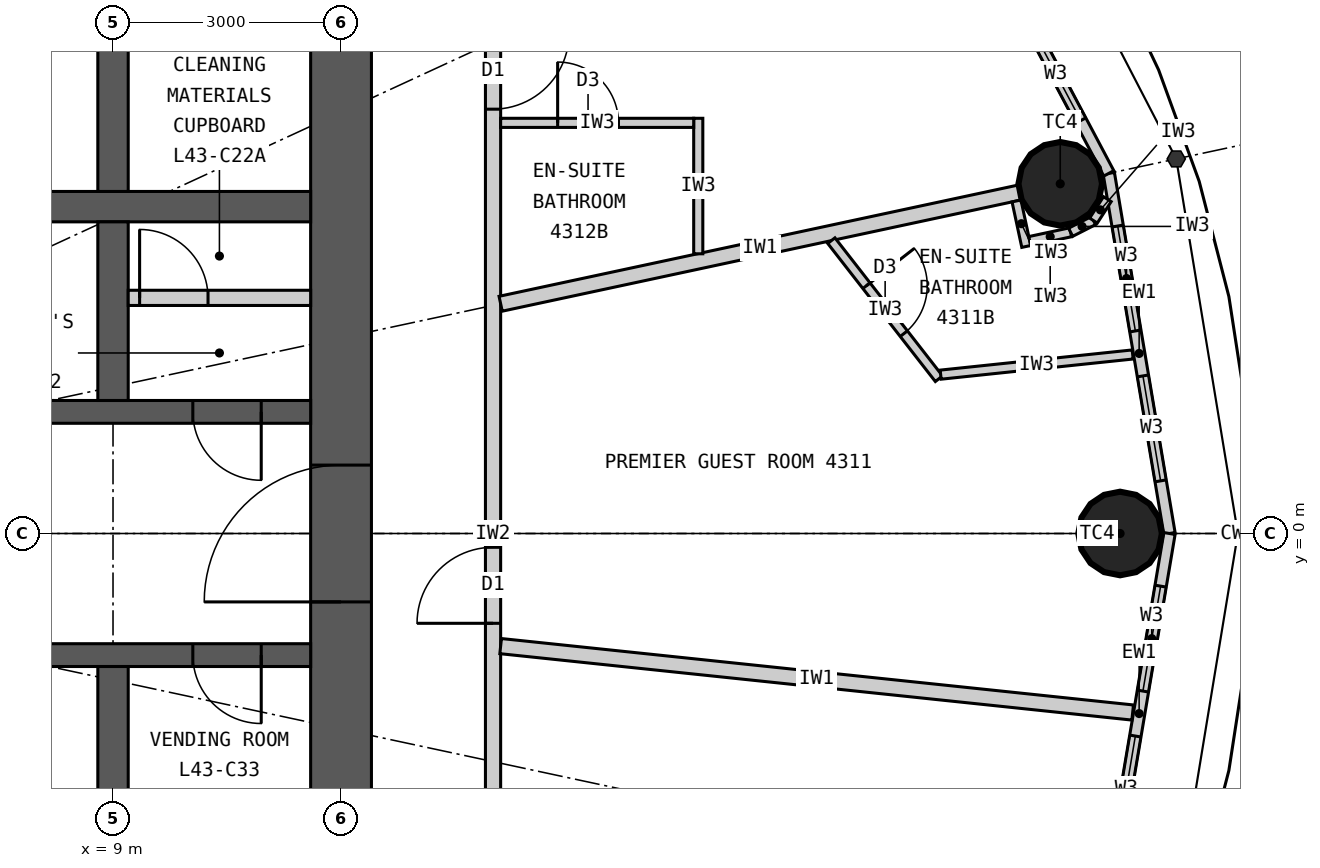
"""IFC4 building model, lengths in metres.
Left out: names, types, materials, properties, quantities, classifications, styles, units other than length and angle.
Written with IfcOpenShell. Run it as: python <this file> out.ifc"""

import sys

from ifc_helpers import new_model, si_unit, direction, frame, frame_2d, origin, origin_2d, place, context, subcontext, project, spatial, rectangle, circle, extrude, element, fill, save


model = new_model("IFC4")
c1 = context("Model", 3, precision=1e-05, world=origin(), true_north=direction((0.0, 1.0)))
c2 = subcontext(c1, "Body", "Model", "MODEL_VIEW")
j1 = project(units=[si_unit("LENGTHUNIT", "METRE"), si_unit("PLANEANGLEUNIT", "RADIAN")], contexts=[c1])
p1 = place(None, origin())
s1 = spatial("IfcSite", under=j1, at=p1, CompositionType="ELEMENT")
p2 = place(p1, origin())
s2 = spatial("IfcBuilding", under=s1, at=p2, CompositionType="ELEMENT")
p3 = place(p2, frame((0.0, 0.0, 163.2)))
s3 = spatial("IfcBuildingStorey", under=s2, at=p3, CompositionType="ELEMENT", Elevation=163.2)
for number, where, z_axis, x_axis in (
    (1, (22.25, 0.0, 0.0), (0.0, 0.0, 1.0), (1.0, 0.0, 0.0)),
    (2, (21.463, 4.601, 0.0), (0.0, 0.0, 1.0), (1.0, 0.0, 0.0)),
):
    element("IfcColumn", number, at=place(p3, frame(where, z_axis=z_axis, x_axis=x_axis)), inside=s3, PredefinedType="COLUMN", context=c2, shape_type="SweptSolid", body=[
        extrude(circle(Radius=0.55, at=origin_2d()), origin(), (0.0, 0.0, 1.0), 3.3),
    ])
p4 = place(p3, frame((12.0, -7.6, 0.0), z_axis=(0.0, 0.0, 1.0), x_axis=(0.0, 1.0, 0.0)))
e3 = element("IfcWall", 3, at=p4, inside=s3, PredefinedType="SHEAR", context=c2, shape_type="SweptSolid", body=[
    extrude(rectangle(XDim=15.2, YDim=0.8, at=frame_2d((7.6, 0.0))), origin(), (0.0, 0.0, 1.0), 3.3),
])
p5 = place(p4, frame((6.7, 0.0, 0.0)))
e4 = element("IfcOpeningElement", 4, at=p5, cuts=e3, PredefinedType="OPENING", context=c2, shape_type="SweptSolid", body=[
    extrude(rectangle(XDim=1.8, YDim=2.2, at=frame_2d((0.9, 1.1))), frame((0.0, 0.41, 0.0), z_axis=(0.0, -1.0, 0.0), x_axis=(1.0, 0.0, 0.0)), (0.0, 0.0, 1.0), 0.82),
])
p6 = place(p3, frame((-11.6, 4.3, 0.0), z_axis=(0.0, 0.0, 1.0), x_axis=(1.0, 0.0, 0.0)))
e5 = element("IfcWall", 5, at=p6, inside=s3, PredefinedType="SHEAR", context=c2, shape_type="SweptSolid", body=[
    extrude(rectangle(XDim=23.2, YDim=0.4, at=frame_2d((11.6, 0.0))), origin(), (0.0, 0.0, 1.0), 3.3),
])
p7 = place(p3, frame((-11.6, 1.6, 0.0), z_axis=(0.0, 0.0, 1.0), x_axis=(1.0, 0.0, 0.0)))
e6 = element("IfcWall", 6, at=p7, inside=s3, PredefinedType="SHEAR", context=c2, shape_type="SweptSolid", body=[
    extrude(rectangle(XDim=23.2, YDim=0.3, at=frame_2d((11.6, 0.0))), origin(), (0.0, 0.0, 1.0), 3.3),
])
p8 = place(p7, frame((9.55, 0.0, 0.0)))
e7 = element("IfcOpeningElement", 7, at=p8, cuts=e6, PredefinedType="OPENING", context=c2, shape_type="SweptSolid", body=[
    extrude(rectangle(XDim=1.1, YDim=2.2, at=frame_2d((0.55, 1.1))), frame((0.0, 0.16, 0.0), z_axis=(0.0, -1.0, 0.0), x_axis=(1.0, 0.0, 0.0)), (0.0, 0.0, 1.0), 0.32),
])
p9 = place(p7, frame((12.55, 0.0, 0.0)))
e8 = element("IfcOpeningElement", 8, at=p9, cuts=e6, PredefinedType="OPENING", context=c2, shape_type="SweptSolid", body=[
    extrude(rectangle(XDim=1.1, YDim=2.2, at=frame_2d((0.55, 1.1))), frame((0.0, 0.16, 0.0), z_axis=(0.0, -1.0, 0.0), x_axis=(1.0, 0.0, 0.0)), (0.0, 0.0, 1.0), 0.32),
])
p10 = place(p7, frame((0.65, 0.0, 0.0)))
e9 = element("IfcOpeningElement", 9, at=p10, cuts=e6, PredefinedType="OPENING", context=c2, shape_type="SweptSolid", body=[
    extrude(rectangle(XDim=0.9, YDim=2.2, at=frame_2d((0.45, 1.1))), frame((0.0, 0.16, 0.0), z_axis=(0.0, -1.0, 0.0), x_axis=(1.0, 0.0, 0.0)), (0.0, 0.0, 1.0), 0.32),
])
p11 = place(p7, frame((21.65, 0.0, 0.0)))
e10 = element("IfcOpeningElement", 10, at=p11, cuts=e6, PredefinedType="OPENING", context=c2, shape_type="SweptSolid", body=[
    extrude(rectangle(XDim=0.9, YDim=2.2, at=frame_2d((0.45, 1.1))), frame((0.0, 0.16, 0.0), z_axis=(0.0, -1.0, 0.0), x_axis=(1.0, 0.0, 0.0)), (0.0, 0.0, 1.0), 0.32),
])
p12 = place(p7, frame((3.65, 0.0, 0.0)))
e11 = element("IfcOpeningElement", 11, at=p12, cuts=e6, PredefinedType="OPENING", context=c2, shape_type="SweptSolid", body=[
    extrude(rectangle(XDim=0.9, YDim=2.2, at=frame_2d((0.45, 1.1))), frame((0.0, 0.16, 0.0), z_axis=(0.0, -1.0, 0.0), x_axis=(1.0, 0.0, 0.0)), (0.0, 0.0, 1.0), 0.32),
])
p13 = place(p7, frame((6.65, 0.0, 0.0)))
e12 = element("IfcOpeningElement", 12, at=p13, cuts=e6, PredefinedType="OPENING", context=c2, shape_type="SweptSolid", body=[
    extrude(rectangle(XDim=0.9, YDim=2.2, at=frame_2d((0.45, 1.1))), frame((0.0, 0.16, 0.0), z_axis=(0.0, -1.0, 0.0), x_axis=(1.0, 0.0, 0.0)), (0.0, 0.0, 1.0), 0.32),
])
p14 = place(p3, frame((-11.6, -1.6, 0.0), z_axis=(0.0, 0.0, 1.0), x_axis=(1.0, 0.0, 0.0)))
e13 = element("IfcWall", 13, at=p14, inside=s3, PredefinedType="SHEAR", context=c2, shape_type="SweptSolid", body=[
    extrude(rectangle(XDim=23.2, YDim=0.3, at=frame_2d((11.6, 0.0))), origin(), (0.0, 0.0, 1.0), 3.3),
])
p15 = place(p14, frame((9.55, 0.0, 0.0)))
e14 = element("IfcOpeningElement", 14, at=p15, cuts=e13, PredefinedType="OPENING", context=c2, shape_type="SweptSolid", body=[
    extrude(rectangle(XDim=1.1, YDim=2.2, at=frame_2d((0.55, 1.1))), frame((0.0, 0.16, 0.0), z_axis=(0.0, -1.0, 0.0), x_axis=(1.0, 0.0, 0.0)), (0.0, 0.0, 1.0), 0.32),
])
p16 = place(p14, frame((15.3, 0.0, 0.0)))
e15 = element("IfcOpeningElement", 15, at=p16, cuts=e13, PredefinedType="OPENING", context=c2, shape_type="SweptSolid", body=[
    extrude(rectangle(XDim=1.6, YDim=2.4, at=frame_2d((0.8, 1.2))), frame((0.0, 0.16, 0.0), z_axis=(0.0, -1.0, 0.0), x_axis=(1.0, 0.0, 0.0)), (0.0, 0.0, 1.0), 0.32),
])
p17 = place(p14, frame((0.65, 0.0, 0.0)))
e16 = element("IfcOpeningElement", 16, at=p17, cuts=e13, PredefinedType="OPENING", context=c2, shape_type="SweptSolid", body=[
    extrude(rectangle(XDim=0.9, YDim=2.2, at=frame_2d((0.45, 1.1))), frame((0.0, 0.16, 0.0), z_axis=(0.0, -1.0, 0.0), x_axis=(1.0, 0.0, 0.0)), (0.0, 0.0, 1.0), 0.32),
])
p18 = place(p14, frame((5.15, 0.0, 0.0)))
e17 = element("IfcOpeningElement", 17, at=p18, cuts=e13, PredefinedType="OPENING", context=c2, shape_type="SweptSolid", body=[
    extrude(rectangle(XDim=0.9, YDim=2.2, at=frame_2d((0.45, 1.1))), frame((0.0, 0.16, 0.0), z_axis=(0.0, -1.0, 0.0), x_axis=(1.0, 0.0, 0.0)), (0.0, 0.0, 1.0), 0.32),
])
p19 = place(p14, frame((21.65, 0.0, 0.0)))
e18 = element("IfcOpeningElement", 18, at=p19, cuts=e13, PredefinedType="OPENING", context=c2, shape_type="SweptSolid", body=[
    extrude(rectangle(XDim=0.9, YDim=2.2, at=frame_2d((0.45, 1.1))), frame((0.0, 0.16, 0.0), z_axis=(0.0, -1.0, 0.0), x_axis=(1.0, 0.0, 0.0)), (0.0, 0.0, 1.0), 0.32),
])
p20 = place(p3, frame((9.0, 4.5, 0.0), z_axis=(0.0, 0.0, 1.0), x_axis=(0.0, 1.0, 0.0)))
e19 = element("IfcWall", 19, at=p20, inside=s3, PredefinedType="SHEAR", context=c2, shape_type="SweptSolid", body=[
    extrude(rectangle(XDim=3.1, YDim=0.4, at=frame_2d((1.55, 0.0))), origin(), (0.0, 0.0, 1.0), 3.3),
])
for number, where, z_axis, x_axis in (
    (20, (9.0, 1.75, 0.0), (0.0, 0.0, 1.0), (0.0, 1.0, 0.0)),
    (21, (9.0, -4.1, 0.0), (0.0, 0.0, 1.0), (0.0, 1.0, 0.0)),
):
    element("IfcWall", number, at=place(p3, frame(where, z_axis=z_axis, x_axis=x_axis)), inside=s3, PredefinedType="SHEAR", context=c2, shape_type="SweptSolid", body=[
        extrude(rectangle(XDim=2.35, YDim=0.4, at=frame_2d((1.175, 0.0))), origin(), (0.0, 0.0, 1.0), 3.3),
    ])
p21 = place(p3, frame((22.9, 0.0, 0.0), z_axis=(0.0, 0.0, 1.0), x_axis=(-0.166162111254, 0.986098449843, 0.0)))
e22 = element("IfcWall", 22, at=p21, inside=s3, PredefinedType="ELEMENTEDWALL", context=c2, shape_type="SweptSolid", body=[
    extrude(rectangle(XDim=4.805, YDim=0.15, at=frame_2d((2.402, 0.0))), origin(), (0.0, 0.0, 1.0), 3.12),
])
p22 = place(p21, frame((0.702, 0.0, 0.9)))
e23 = element("IfcOpeningElement", 23, at=p22, cuts=e22, PredefinedType="OPENING", context=c2, shape_type="SweptSolid", body=[
    extrude(rectangle(XDim=1.4, YDim=1.9, at=frame_2d((0.7, 0.95))), frame((0.0, 0.085, 0.0), z_axis=(0.0, -1.0, 0.0), x_axis=(1.0, 0.0, 0.0)), (0.0, 0.0, 1.0), 0.17),
])
p23 = place(p21, frame((2.702, 0.0, 0.9)))
e24 = element("IfcOpeningElement", 24, at=p23, cuts=e22, PredefinedType="OPENING", context=c2, shape_type="SweptSolid", body=[
    extrude(rectangle(XDim=1.4, YDim=1.9, at=frame_2d((0.7, 0.95))), frame((0.0, 0.085, 0.0), z_axis=(0.0, -1.0, 0.0), x_axis=(1.0, 0.0, 0.0)), (0.0, 0.0, 1.0), 0.17),
])
p24 = place(p3, frame((22.102, 4.738, 0.0), z_axis=(0.0, 0.0, 1.0), x_axis=(-0.468428906714, 0.883501193748, 0.0)))
e25 = element("IfcWall", 25, at=p24, inside=s3, PredefinedType="ELEMENTEDWALL", context=c2, shape_type="SweptSolid", body=[
    extrude(rectangle(XDim=4.974, YDim=0.15, at=frame_2d((2.487, 0.0))), origin(), (0.0, 0.0, 1.0), 3.12),
])
p25 = place(p24, frame((0.787, 0.0, 0.9)))
e26 = element("IfcOpeningElement", 26, at=p25, cuts=e25, PredefinedType="OPENING", context=c2, shape_type="SweptSolid", body=[
    extrude(rectangle(XDim=1.4, YDim=1.9, at=frame_2d((0.7, 0.95))), frame((0.0, 0.085, 0.0), z_axis=(0.0, -1.0, 0.0), x_axis=(1.0, 0.0, 0.0)), (0.0, 0.0, 1.0), 0.17),
])
p26 = place(p24, frame((2.787, 0.0, 0.9)))
e27 = element("IfcOpeningElement", 27, at=p26, cuts=e25, PredefinedType="OPENING", context=c2, shape_type="SweptSolid", body=[
    extrude(rectangle(XDim=1.4, YDim=1.9, at=frame_2d((0.7, 0.95))), frame((0.0, 0.085, 0.0), z_axis=(0.0, -1.0, 0.0), x_axis=(1.0, 0.0, 0.0)), (0.0, 0.0, 1.0), 0.17),
])
p27 = place(p3, frame((22.102, -4.738, 0.0), z_axis=(0.0, 0.0, 1.0), x_axis=(0.166162111254, 0.986098449843, 0.0)))
e28 = element("IfcWall", 28, at=p27, inside=s3, PredefinedType="ELEMENTEDWALL", context=c2, shape_type="SweptSolid", body=[
    extrude(rectangle(XDim=4.805, YDim=0.15, at=frame_2d((2.402, 0.0))), origin(), (0.0, 0.0, 1.0), 3.12),
])
p28 = place(p27, frame((0.702, 0.0, 0.9)))
e29 = element("IfcOpeningElement", 29, at=p28, cuts=e28, PredefinedType="OPENING", context=c2, shape_type="SweptSolid", body=[
    extrude(rectangle(XDim=1.4, YDim=1.9, at=frame_2d((0.7, 0.95))), frame((0.0, 0.085, 0.0), z_axis=(0.0, -1.0, 0.0), x_axis=(1.0, 0.0, 0.0)), (0.0, 0.0, 1.0), 0.17),
])
p29 = place(p27, frame((2.702, 0.0, 0.9)))
e30 = element("IfcOpeningElement", 30, at=p29, cuts=e28, PredefinedType="OPENING", context=c2, shape_type="SweptSolid", body=[
    extrude(rectangle(XDim=1.4, YDim=1.9, at=frame_2d((0.7, 0.95))), frame((0.0, 0.085, 0.0), z_axis=(0.0, -1.0, 0.0), x_axis=(1.0, 0.0, 0.0)), (0.0, 0.0, 1.0), 0.17),
])
p30 = place(p3, frame((14.0, -9.9, 0.0), z_axis=(0.0, 0.0, 1.0), x_axis=(0.0, 1.0, 0.0)))
e31 = element("IfcWall", 31, at=p30, inside=s3, PredefinedType="PARTITIONING", context=c2, shape_type="SweptSolid", body=[
    extrude(rectangle(XDim=19.8, YDim=0.2, at=frame_2d((9.9, 0.0))), origin(), (0.0, 0.0, 1.0), 3.12),
])
p31 = place(p30, frame((3.824, 0.0, 0.0)))
e32 = element("IfcOpeningElement", 32, at=p31, cuts=e31, PredefinedType="OPENING", context=c2, shape_type="SweptSolid", body=[
    extrude(rectangle(XDim=1.0, YDim=2.2, at=frame_2d((0.5, 1.1))), frame((0.0, 0.11, 0.0), z_axis=(0.0, -1.0, 0.0), x_axis=(1.0, 0.0, 0.0)), (0.0, 0.0, 1.0), 0.22),
])
p32 = place(p30, frame((8.719, 0.0, 0.0)))
e33 = element("IfcOpeningElement", 33, at=p32, cuts=e31, PredefinedType="OPENING", context=c2, shape_type="SweptSolid", body=[
    extrude(rectangle(XDim=1.0, YDim=2.2, at=frame_2d((0.5, 1.1))), frame((0.0, 0.11, 0.0), z_axis=(0.0, -1.0, 0.0), x_axis=(1.0, 0.0, 0.0)), (0.0, 0.0, 1.0), 0.22),
])
p33 = place(p30, frame((15.482, 0.0, 0.0)))
e34 = element("IfcOpeningElement", 34, at=p33, cuts=e31, PredefinedType="OPENING", context=c2, shape_type="SweptSolid", body=[
    extrude(rectangle(XDim=1.0, YDim=2.2, at=frame_2d((0.5, 1.1))), frame((0.0, 0.11, 0.0), z_axis=(0.0, -1.0, 0.0), x_axis=(1.0, 0.0, 0.0)), (0.0, 0.0, 1.0), 0.22),
])
p34 = place(p3, frame((14.1, 3.022, 0.0), z_axis=(0.0, 0.0, 1.0), x_axis=(0.977790639684, 0.209584028367, 0.0)))
e35 = element("IfcWall", 35, at=p34, inside=s3, PredefinedType="PARTITIONING", context=c2, shape_type="SweptSolid", body=[
    extrude(rectangle(XDim=6.98, YDim=0.2, at=frame_2d((3.49, 0.0))), origin(), (0.0, 0.0, 1.0), 2.42),
])
p35 = place(p3, frame((14.1, -1.481, 0.0), z_axis=(0.0, 0.0, 1.0), x_axis=(0.994524794819, -0.104500873159, 0.0)))
e36 = element("IfcWall", 36, at=p35, inside=s3, PredefinedType="PARTITIONING", context=c2, shape_type="SweptSolid", body=[
    extrude(rectangle(XDim=8.362, YDim=0.2, at=frame_2d((4.181, 0.0))), origin(), (0.0, 0.0, 1.0), 2.47),
])
p36 = place(p3, frame((18.451, 3.853, 0.0), z_axis=(0.0, 0.0, 1.0), x_axis=(0.614703538382, -0.788758239197, 0.0)))
e37 = element("IfcWall", 37, at=p36, inside=s3, PredefinedType="PARTITIONING", context=c2, shape_type="SweptSolid", body=[
    extrude(rectangle(XDim=2.303, YDim=0.12, at=frame_2d((1.152, 0.0))), origin(), (0.0, 0.0, 1.0), 3.12),
])
p37 = place(p36, frame((0.752, 0.0, 0.0)))
e38 = element("IfcOpeningElement", 38, at=p37, cuts=e37, PredefinedType="OPENING", context=c2, shape_type="SweptSolid", body=[
    extrude(rectangle(XDim=0.8, YDim=2.1, at=frame_2d((0.4, 1.05))), frame((0.0, 0.07, 0.0), z_axis=(0.0, -1.0, 0.0), x_axis=(1.0, 0.0, 0.0)), (0.0, 0.0, 1.0), 0.14),
])
p38 = place(p3, frame((19.89, 2.09, 0.0), z_axis=(0.0, 0.0, 1.0), x_axis=(0.994527025269, 0.104479644, 0.0)))
e39 = element("IfcWall", 39, at=p38, inside=s3, PredefinedType="PARTITIONING", context=c2, shape_type="SweptSolid", body=[
    extrude(rectangle(XDim=2.54, YDim=0.12, at=frame_2d((1.27, 0.0))), origin(), (0.0, 0.0, 1.0), 3.12),
])
p39 = place(p3, frame((20.887, 4.375, 0.0), z_axis=(0.0, 0.0, 1.0), x_axis=(0.209746941802, -0.977755705892, 0.0)))
e40 = element("IfcWall", 40, at=p39, inside=s3, PredefinedType="PARTITIONING", context=c2, shape_type="SweptSolid", body=[
    extrude(rectangle(XDim=0.612, YDim=0.12, at=frame_2d((0.306, 0.0))), origin(), (0.0, 0.0, 1.0), 3.12),
])
p40 = place(p3, frame((21.062, 3.848, 0.0), z_axis=(0.0, 0.0, 1.0), x_axis=(0.977789415726, 0.209589738521, 0.0)))
e41 = element("IfcWall", 41, at=p40, inside=s3, PredefinedType="PARTITIONING", context=c2, shape_type="SweptSolid", body=[
    extrude(rectangle(XDim=0.55, YDim=0.12, at=frame_2d((0.275, 0.0))), origin(), (0.0, 0.0, 1.0), 3.12),
])
p41 = place(p3, frame((21.599, 3.963, 0.0), z_axis=(0.0, 0.0, 1.0), x_axis=(0.890193602875, 0.455582428766, 0.0)))
e42 = element("IfcWall", 42, at=p41, inside=s3, PredefinedType="PARTITIONING", context=c2, shape_type="SweptSolid", body=[
    extrude(rectangle(XDim=0.338, YDim=0.12, at=frame_2d((0.169, 0.0))), origin(), (0.0, 0.0, 1.0), 3.12),
])
p42 = place(p3, frame((21.9, 4.117, 0.0), z_axis=(0.0, 0.0, 1.0), x_axis=(0.543582688681, 0.839355622228, 0.0)))
e43 = element("IfcWall", 43, at=p42, inside=s3, PredefinedType="PARTITIONING", context=c2, shape_type="SweptSolid", body=[
    extrude(rectangle(XDim=0.336, YDim=0.12, at=frame_2d((0.168, 0.0))), origin(), (0.0, 0.0, 1.0), 3.12),
])
p43 = place(p3, frame((16.7, 3.68, 0.0), z_axis=(0.0, 0.0, 1.0), x_axis=(0.0, 1.0, 0.0)))
e44 = element("IfcWall", 44, at=p43, inside=s3, PredefinedType="PARTITIONING", context=c2, shape_type="SweptSolid", body=[
    extrude(rectangle(XDim=1.783, YDim=0.12, at=frame_2d((0.891, 0.0))), origin(), (0.0, 0.0, 1.0), 3.12),
])
p44 = place(p3, frame((14.1, 5.403, 0.0), z_axis=(0.0, 0.0, 1.0), x_axis=(1.0, 0.0, 0.0)))
e45 = element("IfcWall", 45, at=p44, inside=s3, PredefinedType="PARTITIONING", context=c2, shape_type="SweptSolid", body=[
    extrude(rectangle(XDim=2.54, YDim=0.12, at=frame_2d((1.27, 0.0))), origin(), (0.0, 0.0, 1.0), 3.12),
])
p45 = place(p44, frame((0.75, 0.0, 0.0)))
e46 = element("IfcOpeningElement", 46, at=p45, cuts=e45, PredefinedType="OPENING", context=c2, shape_type="SweptSolid", body=[
    extrude(rectangle(XDim=0.8, YDim=2.1, at=frame_2d((0.4, 1.05))), frame((0.0, 0.07, 0.0), z_axis=(0.0, -1.0, 0.0), x_axis=(1.0, 0.0, 0.0)), (0.0, 0.0, 1.0), 0.14),
])
p46 = place(p3, frame((9.2, 3.1, 0.0), z_axis=(0.0, 0.0, 1.0), x_axis=(1.0, 0.0, 0.0)))
e47 = element("IfcWall", 47, at=p46, inside=s3, PredefinedType="PARTITIONING", context=c2, shape_type="SweptSolid", body=[
    extrude(rectangle(XDim=2.4, YDim=0.2, at=frame_2d((1.2, 0.0))), origin(), (0.0, 0.0, 1.0), 3.12),
])
p47 = place(p46, frame((0.15, 0.0, 0.0)))
e48 = element("IfcOpeningElement", 48, at=p47, cuts=e47, PredefinedType="OPENING", context=c2, shape_type="SweptSolid", body=[
    extrude(rectangle(XDim=0.9, YDim=2.2, at=frame_2d((0.45, 1.1))), frame((0.0, 0.11, 0.0), z_axis=(0.0, -1.0, 0.0), x_axis=(1.0, 0.0, 0.0)), (0.0, 0.0, 1.0), 0.22),
])
p48 = place(p22, origin())
e49 = element("IfcWindow", 49, at=p48, inside=s3, PartitioningType="SINGLE_PANEL", PredefinedType="WINDOW", context=c2, shape_type="SweptSolid", body=[
    extrude(rectangle(XDim=1.4, YDim=1.9, at=frame_2d((0.7, 0.95))), frame((0.0, 0.03, 0.0), z_axis=(0.0, -1.0, 0.0), x_axis=(1.0, 0.0, 0.0)), (0.0, 0.0, 1.0), 0.06),
])
fill(e23, e49)
p49 = place(p23, origin())
e50 = element("IfcWindow", 50, at=p49, inside=s3, PartitioningType="SINGLE_PANEL", PredefinedType="WINDOW", context=c2, shape_type="SweptSolid", body=[
    extrude(rectangle(XDim=1.4, YDim=1.9, at=frame_2d((0.7, 0.95))), frame((0.0, 0.03, 0.0), z_axis=(0.0, -1.0, 0.0), x_axis=(1.0, 0.0, 0.0)), (0.0, 0.0, 1.0), 0.06),
])
fill(e24, e50)
p50 = place(p25, origin())
e51 = element("IfcWindow", 51, at=p50, inside=s3, PartitioningType="SINGLE_PANEL", PredefinedType="WINDOW", context=c2, shape_type="SweptSolid", body=[
    extrude(rectangle(XDim=1.4, YDim=1.9, at=frame_2d((0.7, 0.95))), frame((0.0, 0.03, 0.0), z_axis=(0.0, -1.0, 0.0), x_axis=(1.0, 0.0, 0.0)), (0.0, 0.0, 1.0), 0.06),
])
fill(e26, e51)
p51 = place(p28, origin())
e52 = element("IfcWindow", 52, at=p51, inside=s3, PartitioningType="SINGLE_PANEL", PredefinedType="WINDOW", context=c2, shape_type="SweptSolid", body=[
    extrude(rectangle(XDim=1.4, YDim=1.9, at=frame_2d((0.7, 0.95))), frame((0.0, 0.03, 0.0), z_axis=(0.0, -1.0, 0.0), x_axis=(1.0, 0.0, 0.0)), (0.0, 0.0, 1.0), 0.06),
])
fill(e29, e52)
p52 = place(p29, origin())
e53 = element("IfcWindow", 53, at=p52, inside=s3, PartitioningType="SINGLE_PANEL", PredefinedType="WINDOW", context=c2, shape_type="SweptSolid", body=[
    extrude(rectangle(XDim=1.4, YDim=1.9, at=frame_2d((0.7, 0.95))), frame((0.0, 0.03, 0.0), z_axis=(0.0, -1.0, 0.0), x_axis=(1.0, 0.0, 0.0)), (0.0, 0.0, 1.0), 0.06),
])
fill(e30, e53)
p53 = place(p37, origin())
e54 = element("IfcDoor", 54, at=p53, inside=s3, OperationType="SINGLE_SWING_LEFT", PredefinedType="DOOR", context=c2, shape_type="SweptSolid", body=[
    extrude(rectangle(XDim=0.8, YDim=2.1, at=frame_2d((0.4, 1.05))), frame((0.0, 0.025, 0.0), z_axis=(0.0, -1.0, 0.0), x_axis=(1.0, 0.0, 0.0)), (0.0, 0.0, 1.0), 0.05),
])
fill(e38, e54)
p54 = place(p32, origin())
e55 = element("IfcDoor", 55, at=p54, inside=s3, OperationType="SINGLE_SWING_LEFT", PredefinedType="DOOR", context=c2, shape_type="SweptSolid", body=[
    extrude(rectangle(XDim=1.0, YDim=2.2, at=frame_2d((0.5, 1.1))), frame((0.0, 0.025, 0.0), z_axis=(0.0, -1.0, 0.0), x_axis=(1.0, 0.0, 0.0)), (0.0, 0.0, 1.0), 0.05),
])
fill(e33, e55)
p55 = place(p45, origin())
e56 = element("IfcDoor", 56, at=p55, inside=s3, OperationType="SINGLE_SWING_LEFT", PredefinedType="DOOR", context=c2, shape_type="SweptSolid", body=[
    extrude(rectangle(XDim=0.8, YDim=2.1, at=frame_2d((0.4, 1.05))), frame((0.0, 0.025, 0.0), z_axis=(0.0, -1.0, 0.0), x_axis=(1.0, 0.0, 0.0)), (0.0, 0.0, 1.0), 0.05),
])
fill(e46, e56)
p56 = place(p33, origin())
e57 = element("IfcDoor", 57, at=p56, inside=s3, OperationType="SINGLE_SWING_RIGHT", PredefinedType="DOOR", context=c2, shape_type="SweptSolid", body=[
    extrude(rectangle(XDim=1.0, YDim=2.2, at=frame_2d((0.5, 1.1))), frame((0.0, 0.025, 0.0), z_axis=(0.0, -1.0, 0.0), x_axis=(1.0, 0.0, 0.0)), (0.0, 0.0, 1.0), 0.05),
])
fill(e34, e57)
p57 = place(p47, origin())
e58 = element("IfcDoor", 58, at=p57, inside=s3, OperationType="SINGLE_SWING_LEFT", PredefinedType="DOOR", context=c2, shape_type="SweptSolid", body=[
    extrude(rectangle(XDim=0.9, YDim=2.2, at=frame_2d((0.45, 1.1))), frame((0.0, 0.025, 0.0), z_axis=(0.0, -1.0, 0.0), x_axis=(1.0, 0.0, 0.0)), (0.0, 0.0, 1.0), 0.05),
])
fill(e48, e58)
p58 = place(p11, origin())
e59 = element("IfcDoor", 59, at=p58, inside=s3, OperationType="SINGLE_SWING_RIGHT", PredefinedType="DOOR", context=c2, shape_type="SweptSolid", body=[
    extrude(rectangle(XDim=0.9, YDim=2.2, at=frame_2d((0.45, 1.1))), frame((0.0, 0.025, 0.0), z_axis=(0.0, -1.0, 0.0), x_axis=(1.0, 0.0, 0.0)), (0.0, 0.0, 1.0), 0.05),
])
fill(e10, e59)
p59 = place(p19, origin())
e60 = element("IfcDoor", 60, at=p59, inside=s3, OperationType="SINGLE_SWING_RIGHT", PredefinedType="DOOR", context=c2, shape_type="SweptSolid", body=[
    extrude(rectangle(XDim=0.9, YDim=2.2, at=frame_2d((0.45, 1.1))), frame((0.0, 0.025, 0.0), z_axis=(0.0, -1.0, 0.0), x_axis=(1.0, 0.0, 0.0)), (0.0, 0.0, 1.0), 0.05),
])
fill(e18, e60)
p60 = place(p5, origin())
e61 = element("IfcDoor", 61, at=p60, inside=s3, OperationType="DOUBLE_DOOR_DOUBLE_SWING", PredefinedType="DOOR", context=c2, shape_type="SweptSolid", body=[
    extrude(rectangle(XDim=1.8, YDim=2.2, at=frame_2d((0.9, 1.1))), frame((0.0, 0.025, 0.0), z_axis=(0.0, -1.0, 0.0), x_axis=(1.0, 0.0, 0.0)), (0.0, 0.0, 1.0), 0.05),
])
fill(e4, e61)
save(model, sys.argv[1])
